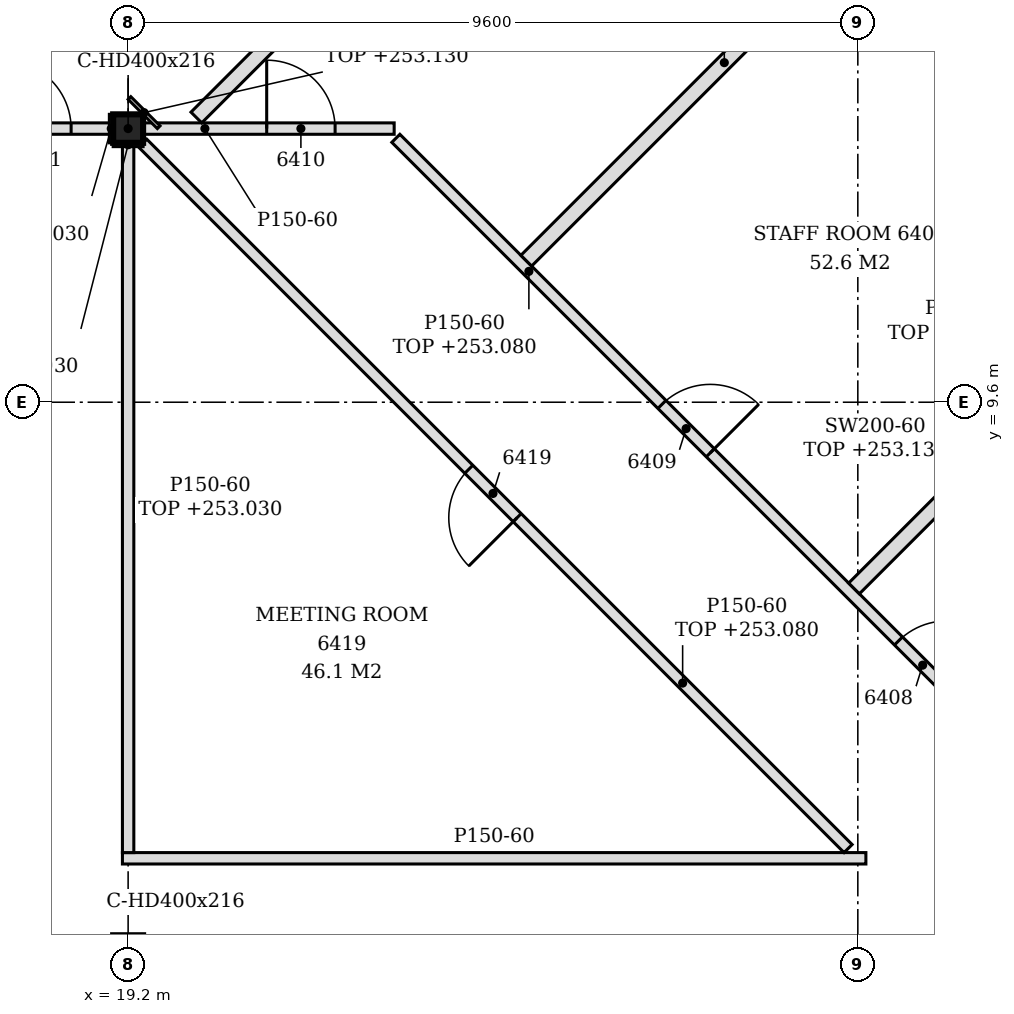
"""IFC4 building model, lengths in metres.
Left out: names, types, materials, properties, quantities, classifications, styles, units other than length and angle.
Written with IfcOpenShell. Run it as: python <this file> out.ifc"""

import sys

from ifc_helpers import new_model, si_unit, direction, frame, frame_2d, origin, origin_2d, place, context, subcontext, project, spatial, polyline, rectangle, i_section, outline, extrude, element, fill, save


model = new_model("IFC4")
c1 = context("Model", 3, precision=1e-05, world=origin(), true_north=direction((0.0, 1.0)))
c2 = subcontext(c1, "Body", "Model", "MODEL_VIEW")
j1 = project(units=[si_unit("LENGTHUNIT", "METRE"), si_unit("PLANEANGLEUNIT", "RADIAN")], contexts=[c1])
p1 = place(None, origin())
s1 = spatial("IfcSite", under=j1, at=p1, CompositionType="ELEMENT")
p2 = place(p1, origin())
s2 = spatial("IfcBuilding", under=s1, at=p2, CompositionType="ELEMENT")
p3 = place(p2, frame((0.0, 0.0, 250.2)))
s3 = spatial("IfcBuildingStorey", under=s2, at=p3, CompositionType="ELEMENT", Elevation=250.2)
p4 = place(p3, frame((19.2, 13.2, -0.15), z_axis=(0.0, 0.0, 1.0), x_axis=(1.0, 0.0, 0.0)))
e1 = element("IfcColumn", 1, at=p4, inside=s3, PredefinedType="COLUMN", context=c2, shape_type="SweptSolid", body=[
    extrude(i_section(OverallWidth=0.394, OverallDepth=0.375, WebThickness=0.017, FlangeThickness=0.028, FilletRadius=0.015, at=origin_2d()), origin(), (0.0, 0.0, 1.0), 3.6),
])
p5 = place(p3, frame((34.8, 0.994, 0.0), z_axis=(0.0, 0.0, 1.0), x_axis=(-0.707099634543, 0.707113927758, 0.0)))
e2 = element("IfcWall", 2, at=p5, inside=s3, PredefinedType="PARTITIONING", context=c2, shape_type="SweptSolid", body=[
    extrude(rectangle(XDim=17.081, YDim=0.15, at=frame_2d((8.541, 0.0))), origin(), (0.0, 0.0, 1.0), 2.88),
])
p6 = place(p5, frame((3.276, 0.0, 0.0)))
e3 = element("IfcOpeningElement", 3, at=p6, cuts=e2, PredefinedType="OPENING", context=c2, shape_type="SweptSolid", body=[
    extrude(rectangle(XDim=0.9, YDim=2.1, at=frame_2d((0.45, 1.05))), frame((0.0, 0.085, 0.0), z_axis=(0.0, -1.0, 0.0), x_axis=(1.0, 0.0, 0.0)), (0.0, 0.0, 1.0), 0.17),
])
p7 = place(p5, frame((6.829, 0.0, 0.0)))
e4 = element("IfcOpeningElement", 4, at=p7, cuts=e2, PredefinedType="OPENING", context=c2, shape_type="SweptSolid", body=[
    extrude(rectangle(XDim=0.9, YDim=2.1, at=frame_2d((0.45, 1.05))), frame((0.0, 0.085, 0.0), z_axis=(0.0, -1.0, 0.0), x_axis=(1.0, 0.0, 0.0)), (0.0, 0.0, 1.0), 0.17),
])
p8 = place(p5, frame((11.23, 0.0, 0.0)))
e5 = element("IfcOpeningElement", 5, at=p8, cuts=e2, PredefinedType="OPENING", context=c2, shape_type="SweptSolid", body=[
    extrude(rectangle(XDim=0.9, YDim=2.1, at=frame_2d((0.45, 1.05))), frame((0.0, 0.085, 0.0), z_axis=(0.0, -1.0, 0.0), x_axis=(1.0, 0.0, 0.0)), (0.0, 0.0, 1.0), 0.17),
])
p9 = place(p3, frame((19.125, 3.6, 0.0), z_axis=(0.0, 0.0, 1.0), x_axis=(1.0, 0.0, 0.0)))
e6 = element("IfcWall", 6, at=p9, inside=s3, PredefinedType="PARTITIONING", context=c2, shape_type="SweptSolid", body=[
    extrude(outline(polyline([(0.0, 0.0), (9.781, 0.0), (9.781, 3.45), (0.225, 3.45), (0.223, 2.83), (0.0, 2.83), (0.0, 0.0)])), frame((0.0, 0.075, 0.0), z_axis=(0.0, -1.0, 0.0), x_axis=(1.0, 0.0, 0.0)), (0.0, 0.0, 1.0), 0.15),
])
p10 = place(p3, frame((19.2, 3.675, 0.0), z_axis=(0.0, 0.0, 1.0), x_axis=(0.0, 1.0, 0.0)))
e7 = element("IfcWall", 7, at=p10, inside=s3, PredefinedType="PARTITIONING", context=c2, shape_type="SweptSolid", body=[
    extrude(rectangle(XDim=9.337, YDim=0.15, at=frame_2d((4.669, 0.0))), origin(), (0.0, 0.0, 1.0), 2.83),
])
p11 = place(p3, frame((28.672, 3.728, 0.0), z_axis=(0.0, 0.0, 1.0), x_axis=(-0.707106781187, 0.707106781187, 0.0)))
e8 = element("IfcWall", 8, at=p11, inside=s3, PredefinedType="PARTITIONING", context=c2, shape_type="SweptSolid", body=[
    extrude(rectangle(XDim=13.124, YDim=0.15, at=frame_2d((6.562, 0.0))), origin(), (0.0, 0.0, 1.0), 2.88),
])
p12 = place(p11, frame((6.157, 0.0, 0.0)))
e9 = element("IfcOpeningElement", 9, at=p12, cuts=e8, PredefinedType="OPENING", context=c2, shape_type="SweptSolid", body=[
    extrude(rectangle(XDim=0.9, YDim=2.1, at=frame_2d((0.45, 1.05))), frame((0.0, 0.085, 0.0), z_axis=(0.0, -1.0, 0.0), x_axis=(1.0, 0.0, 0.0)), (0.0, 0.0, 1.0), 0.17),
])
p13 = place(p3, frame((28.75, 7.15, 0.0), z_axis=(0.0, 0.0, 1.0), x_axis=(0.7070684525, 0.707145107796, 0.0)))
e10 = element("IfcWall", 10, at=p13, inside=s3, PredefinedType="PARTITIONING", context=c2, shape_type="SweptSolid", body=[
    extrude(rectangle(XDim=3.185, YDim=0.2, at=frame_2d((1.592, 0.0))), origin(), (0.0, 0.0, 1.0), 2.93),
])
p14 = place(p3, frame((24.438, 11.462, 0.0), z_axis=(0.0, 0.0, 1.0), x_axis=(0.707090216072, 0.707123345913, 0.0)))
e11 = element("IfcWall", 11, at=p14, inside=s3, PredefinedType="PARTITIONING", context=c2, shape_type="SweptSolid", body=[
    extrude(rectangle(XDim=7.369, YDim=0.2, at=frame_2d((3.685, 0.0))), origin(), (0.0, 0.0, 1.0), 2.88),
])
p15 = place(p3, frame((7.397, 13.2, 0.0), z_axis=(0.0, 0.0, 1.0), x_axis=(1.0, 0.0, 0.0)))
e12 = element("IfcWall", 12, at=p15, inside=s3, PredefinedType="PARTITIONING", context=c2, shape_type="SweptSolid", body=[
    extrude(rectangle(XDim=11.606, YDim=0.15, at=frame_2d((5.803, 0.0))), origin(), (0.0, 0.0, 1.0), 2.83),
])
p16 = place(p15, frame((10.153, 0.0, 0.0)))
e13 = element("IfcOpeningElement", 13, at=p16, cuts=e12, PredefinedType="OPENING", context=c2, shape_type="SweptSolid", body=[
    extrude(rectangle(XDim=0.9, YDim=2.1, at=frame_2d((0.45, 1.05))), frame((0.0, 0.085, 0.0), z_axis=(0.0, -1.0, 0.0), x_axis=(1.0, 0.0, 0.0)), (0.0, 0.0, 1.0), 0.17),
])
p17 = place(p3, frame((19.397, 13.2, 0.0), z_axis=(0.0, 0.0, 1.0), x_axis=(1.0, 0.0, 0.0)))
e14 = element("IfcWall", 14, at=p17, inside=s3, PredefinedType="PARTITIONING", context=c2, shape_type="SweptSolid", body=[
    extrude(rectangle(XDim=3.303, YDim=0.15, at=frame_2d((1.652, 0.0))), origin(), (0.0, 0.0, 1.0), 3.45),
])
p18 = place(p17, frame((1.626, 0.0, 0.0)))
e15 = element("IfcOpeningElement", 15, at=p18, cuts=e14, PredefinedType="OPENING", context=c2, shape_type="SweptSolid", body=[
    extrude(rectangle(XDim=0.9, YDim=2.1, at=frame_2d((0.45, 1.05))), frame((0.0, 0.085, 0.0), z_axis=(0.0, -1.0, 0.0), x_axis=(1.0, 0.0, 0.0)), (0.0, 0.0, 1.0), 0.17),
])
p19 = place(p3, frame((20.098, 13.346, 0.0), z_axis=(0.0, 0.0, 1.0), x_axis=(0.707119095079, 0.70709446708, 0.0)))
e16 = element("IfcWall", 16, at=p19, inside=s3, PredefinedType="PARTITIONING", context=c2, shape_type="SweptSolid", body=[
    extrude(rectangle(XDim=9.913, YDim=0.2, at=frame_2d((4.957, 0.0))), origin(), (0.0, 0.0, 1.0), 2.88),
])
p20 = place(p3, frame((18.978, 13.012, 0.0), z_axis=(0.0, 0.0, 1.0), x_axis=(0.0, 1.0, 0.0)))
e17 = element("IfcWall", 17, at=p20, inside=s3, PredefinedType="PARTITIONING", context=c2, shape_type="SweptSolid", body=[
    extrude(rectangle(XDim=0.375, YDim=0.05, at=frame_2d((0.188, 0.0))), origin(), (0.0, 0.0, 1.0), 2.83),
])
p21 = place(p3, frame((19.602, 13.218, 0.0), z_axis=(0.0, 0.0, 1.0), x_axis=(-0.707106781187, 0.707106781187, 0.0)))
e18 = element("IfcWall", 18, at=p21, inside=s3, PredefinedType="PARTITIONING", context=c2, shape_type="SweptSolid", body=[
    extrude(rectangle(XDim=0.544, YDim=0.05, at=frame_2d((0.272, 0.0))), origin(), (0.0, 0.0, 1.0), 2.93),
])
p22 = place(p3, frame((19.003, 12.988, 0.0), z_axis=(0.0, 0.0, 1.0), x_axis=(1.0, 0.0, 0.0)))
e19 = element("IfcWall", 19, at=p22, inside=s3, PredefinedType="PARTITIONING", context=c2, shape_type="SweptSolid", body=[
    extrude(rectangle(XDim=0.394, YDim=0.05, at=frame_2d((0.197, 0.0))), origin(), (0.0, 0.0, 1.0), 2.83),
])
p23 = place(p7, frame((0.9, 0.0, 0.0), z_axis=(0.0, 0.0, 1.0), x_axis=(-1.0, 0.0, 0.0)))
e20 = element("IfcDoor", 20, at=p23, inside=s3, OperationType="SINGLE_SWING_RIGHT", PredefinedType="DOOR", context=c2, shape_type="SweptSolid", body=[
    extrude(rectangle(XDim=0.9, YDim=2.1, at=frame_2d((0.45, 1.05))), frame((0.0, 0.025, 0.0), z_axis=(0.0, -1.0, 0.0), x_axis=(1.0, 0.0, 0.0)), (0.0, 0.0, 1.0), 0.05),
])
fill(e4, e20)
p24 = place(p8, frame((0.9, 0.0, 0.0), z_axis=(0.0, 0.0, 1.0), x_axis=(-1.0, 0.0, 0.0)))
e21 = element("IfcDoor", 21, at=p24, inside=s3, OperationType="SINGLE_SWING_RIGHT", PredefinedType="DOOR", context=c2, shape_type="SweptSolid", body=[
    extrude(rectangle(XDim=0.9, YDim=2.1, at=frame_2d((0.45, 1.05))), frame((0.0, 0.025, 0.0), z_axis=(0.0, -1.0, 0.0), x_axis=(1.0, 0.0, 0.0)), (0.0, 0.0, 1.0), 0.05),
])
fill(e5, e21)
p25 = place(p18, origin())
e22 = element("IfcDoor", 22, at=p25, inside=s3, OperationType="SINGLE_SWING_LEFT", PredefinedType="DOOR", context=c2, shape_type="SweptSolid", body=[
    extrude(rectangle(XDim=0.9, YDim=2.1, at=frame_2d((0.45, 1.05))), frame((0.0, 0.025, 0.0), z_axis=(0.0, -1.0, 0.0), x_axis=(1.0, 0.0, 0.0)), (0.0, 0.0, 1.0), 0.05),
])
fill(e15, e22)
p26 = place(p16, origin())
e23 = element("IfcDoor", 23, at=p26, inside=s3, OperationType="SINGLE_SWING_LEFT", PredefinedType="DOOR", context=c2, shape_type="SweptSolid", body=[
    extrude(rectangle(XDim=0.9, YDim=2.1, at=frame_2d((0.45, 1.05))), frame((0.0, 0.025, 0.0), z_axis=(0.0, -1.0, 0.0), x_axis=(1.0, 0.0, 0.0)), (0.0, 0.0, 1.0), 0.05),
])
fill(e13, e23)
p27 = place(p12, origin())
e24 = element("IfcDoor", 24, at=p27, inside=s3, OperationType="SINGLE_SWING_LEFT", PredefinedType="DOOR", context=c2, shape_type="SweptSolid", body=[
    extrude(rectangle(XDim=0.9, YDim=2.1, at=frame_2d((0.45, 1.05))), frame((0.0, 0.025, 0.0), z_axis=(0.0, -1.0, 0.0), x_axis=(1.0, 0.0, 0.0)), (0.0, 0.0, 1.0), 0.05),
])
fill(e9, e24)
save(model, sys.argv[1])
